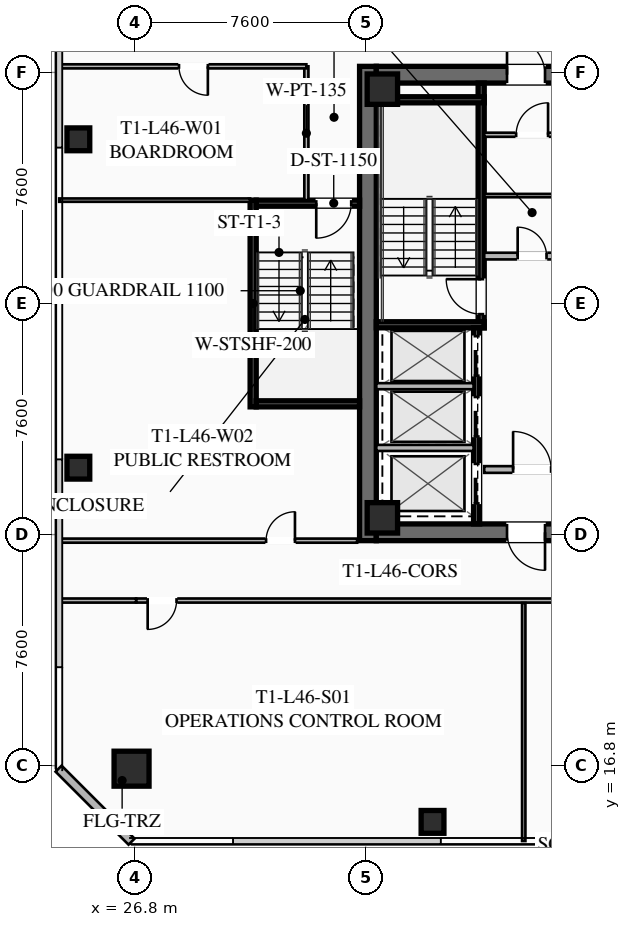
"""IFC4 building model, lengths in metres.
Left out: names, types, materials, properties, quantities, classifications, styles, units other than length and angle.
Written with IfcOpenShell. Run it as: python <this file> out.ifc"""

import sys

from ifc_helpers import new_model, si_unit, direction, frame, frame_2d, origin, origin_2d, place, context, subcontext, project, spatial, rectangle, hollow_rectangle, extrude, element, fill, save


model = new_model("IFC4")
c1 = context("Model", 3, precision=1e-05, world=origin(), true_north=direction((0.0, 1.0)))
c2 = subcontext(c1, "Body", "Model", "MODEL_VIEW")
j1 = project(units=[si_unit("LENGTHUNIT", "METRE"), si_unit("PLANEANGLEUNIT", "RADIAN")], contexts=[c1])
p1 = place(None, origin())
s1 = spatial("IfcSite", under=j1, at=p1, CompositionType="ELEMENT")
p2 = place(p1, origin())
s2 = spatial("IfcBuilding", under=s1, at=p2, CompositionType="ELEMENT")
p3 = place(p2, frame((0.0, 0.0, 171.2)))
s3 = spatial("IfcBuildingStorey", under=s2, at=p3, CompositionType="ELEMENT", Elevation=171.2)
p4 = place(p3, frame((34.475, 24.2, 0.0), z_axis=(0.0, 0.0, 1.0), x_axis=(0.0, 1.0, 0.0)))
e1 = element("IfcWall", 1, at=p4, inside=s3, PredefinedType="SHEAR", context=c2, shape_type="SweptSolid", body=[
    extrude(rectangle(XDim=15.6, YDim=0.55, at=frame_2d((7.8, 0.0))), origin(), (0.0, 0.0, 1.0), 3.55),
])
p5 = place(p3, frame((49.25, 24.475, 0.0), z_axis=(0.0, 0.0, 1.0), x_axis=(-1.0, 0.0, 0.0)))
e2 = element("IfcWall", 2, at=p5, inside=s3, PredefinedType="SHEAR", context=c2, shape_type="SweptSolid", body=[
    extrude(rectangle(XDim=14.5, YDim=0.55, at=frame_2d((7.25, 0.0))), origin(), (0.0, 0.0, 1.0), 3.55),
])
p6 = place(p5, frame((8.95, 0.0, 0.0)))
e3 = element("IfcOpeningElement", 3, at=p6, cuts=e2, PredefinedType="OPENING", context=c2, shape_type="SweptSolid", body=[
    extrude(rectangle(XDim=1.25, YDim=2.25, at=frame_2d((0.625, 1.125))), frame((0.0, 0.285, 0.0), z_axis=(0.0, -1.0, 0.0), x_axis=(1.0, 0.0, 0.0)), (0.0, 0.0, 1.0), 0.57),
])
p7 = place(p5, frame((3.9, 0.0, 0.0)))
e4 = element("IfcOpeningElement", 4, at=p7, cuts=e2, PredefinedType="OPENING", context=c2, shape_type="SweptSolid", body=[
    extrude(rectangle(XDim=1.25, YDim=2.25, at=frame_2d((0.625, 1.125))), frame((0.0, 0.285, 0.0), z_axis=(0.0, -1.0, 0.0), x_axis=(1.0, 0.0, 0.0)), (0.0, 0.0, 1.0), 0.57),
])
p8 = place(p3, frame((34.75, 39.525, 0.0), z_axis=(0.0, 0.0, 1.0), x_axis=(1.0, 0.0, 0.0)))
e5 = element("IfcWall", 5, at=p8, inside=s3, PredefinedType="SHEAR", context=c2, shape_type="SweptSolid", body=[
    extrude(rectangle(XDim=14.5, YDim=0.55, at=frame_2d((7.25, 0.0))), origin(), (0.0, 0.0, 1.0), 3.55),
])
p9 = place(p8, frame((4.3, 0.0, 0.0)))
e6 = element("IfcOpeningElement", 6, at=p9, cuts=e5, PredefinedType="OPENING", context=c2, shape_type="SweptSolid", body=[
    extrude(rectangle(XDim=1.25, YDim=2.25, at=frame_2d((0.625, 1.125))), frame((0.0, 0.285, 0.0), z_axis=(0.0, -1.0, 0.0), x_axis=(1.0, 0.0, 0.0)), (0.0, 0.0, 1.0), 0.57),
])
p10 = place(p8, frame((9.35, 0.0, 0.0)))
e7 = element("IfcOpeningElement", 7, at=p10, cuts=e5, PredefinedType="OPENING", context=c2, shape_type="SweptSolid", body=[
    extrude(rectangle(XDim=1.25, YDim=2.25, at=frame_2d((0.625, 1.125))), frame((0.0, 0.285, 0.0), z_axis=(0.0, -1.0, 0.0), x_axis=(1.0, 0.0, 0.0)), (0.0, 0.0, 1.0), 0.57),
])
for number, where, z_axis, x_axis in (
    (8, (34.95, 24.95, 0.0), (0.0, 0.0, 1.0), (1.0, 0.0, 0.0)),
    (9, (34.95, 39.05, 0.0), (0.0, 0.0, 1.0), (1.0, 0.0, 0.0)),
):
    element("IfcColumn", number, at=place(p3, frame(where, z_axis=z_axis, x_axis=x_axis)), inside=s3, PredefinedType="COLUMN", context=c2, shape_type="SweptSolid", body=[
        extrude(hollow_rectangle(XDim=1.0, YDim=1.0, WallThickness=0.04, at=origin_2d()), origin(), (0.0, 0.0, 1.0), 3.37),
    ])
p11 = place(p3, frame((26.7, 16.7, 0.0), z_axis=(0.0, 0.0, 1.0), x_axis=(1.0, 0.0, 0.0)))
e10 = element("IfcColumn", 10, at=p11, inside=s3, PredefinedType="COLUMN", context=c2, shape_type="SweptSolid", body=[
    extrude(hollow_rectangle(XDim=1.15, YDim=1.15, WallThickness=0.045, at=origin_2d()), origin(), (0.0, 0.0, 1.0), 3.37),
])
for number, where, z_axis, x_axis in (
    (11, (36.6, 14.95, 0.0), (0.0, 0.0, 1.0), (1.0, 0.0, 0.0)),
    (12, (24.95, 37.4, 0.0), (0.0, 0.0, 1.0), (1.0, 0.0, 0.0)),
    (13, (24.95, 26.6, 0.0), (0.0, 0.0, 1.0), (1.0, 0.0, 0.0)),
):
    element("IfcColumn", number, at=place(p3, frame(where, z_axis=z_axis, x_axis=x_axis)), inside=s3, PredefinedType="COLUMN", context=c2, shape_type="SweptSolid", body=[
        extrude(hollow_rectangle(XDim=0.75, YDim=0.75, WallThickness=0.032, at=origin_2d()), origin(), (0.0, 0.0, 1.0), 3.37),
    ])
p12 = place(p3, frame((26.7, 14.3, 0.0), z_axis=(0.0, 0.0, 1.0), x_axis=(-0.707106781187, 0.707106781187, 0.0)))
e14 = element("IfcWall", 14, at=p12, inside=s3, PredefinedType="SOLIDWALL", context=c2, shape_type="SweptSolid", body=[
    extrude(rectangle(XDim=3.394, YDim=0.28, at=frame_2d((1.697, 0.0))), origin(), (0.0, 0.0, 1.0), 3.37),
])
p13 = place(p3, frame((38.2, 31.2, 0.0), z_axis=(0.0, 0.0, 1.0), x_axis=(0.0, 1.0, 0.0)))
e15 = element("IfcWall", 15, at=p13, inside=s3, PredefinedType="SHEAR", context=c2, shape_type="SweptSolid", body=[
    extrude(rectangle(XDim=8.05, YDim=0.2, at=frame_2d((4.025, 0.0))), origin(), (0.0, 0.0, 1.0), 3.37),
])
p14 = place(p13, frame((0.45, 0.0, 0.0)))
e16 = element("IfcOpeningElement", 16, at=p14, cuts=e15, PredefinedType="OPENING", context=c2, shape_type="SweptSolid", body=[
    extrude(rectangle(XDim=1.15, YDim=2.2, at=frame_2d((0.575, 1.1))), frame((0.0, 0.11, 0.0), z_axis=(0.0, -1.0, 0.0), x_axis=(1.0, 0.0, 0.0)), (0.0, 0.0, 1.0), 0.22),
])
for number, where, z_axis, x_axis in (
    (17, (34.75, 31.3, 0.0), (0.0, 0.0, 1.0), (1.0, 0.0, 0.0)),
    (18, (34.75, 38.7, 0.0), (0.0, 0.0, 1.0), (1.0, 0.0, 0.0)),
):
    element("IfcWall", number, at=place(p3, frame(where, z_axis=z_axis, x_axis=x_axis)), inside=s3, PredefinedType="SHEAR", context=c2, shape_type="SweptSolid", body=[
        extrude(rectangle(XDim=3.55, YDim=0.2, at=frame_2d((1.775, 0.0))), origin(), (0.0, 0.0, 1.0), 3.37),
    ])
p15 = place(p3, frame((38.3, 33.56, 0.0), z_axis=(0.0, 0.0, 1.0), x_axis=(1.0, 0.0, 0.0)))
e19 = element("IfcWall", 19, at=p15, inside=s3, PredefinedType="SOLIDWALL", context=c2, shape_type="SweptSolid", body=[
    extrude(rectangle(XDim=3.15, YDim=0.22, at=frame_2d((1.575, 0.0))), origin(), (0.0, 0.0, 1.0), 2.723),
])
p16 = place(p15, frame((1.1, 0.0, 0.0)))
e20 = element("IfcOpeningElement", 20, at=p16, cuts=e19, PredefinedType="OPENING", context=c2, shape_type="SweptSolid", body=[
    extrude(rectangle(XDim=0.95, YDim=2.05, at=frame_2d((0.475, 1.025))), frame((0.0, 0.12, 0.0), z_axis=(0.0, -1.0, 0.0), x_axis=(1.0, 0.0, 0.0)), (0.0, 0.0, 1.0), 0.24),
])
p17 = place(p3, frame((38.3, 26.54, 0.0), z_axis=(0.0, 0.0, 1.0), x_axis=(1.0, 0.0, 0.0)))
e21 = element("IfcWall", 21, at=p17, inside=s3, PredefinedType="SOLIDWALL", context=c2, shape_type="SweptSolid", body=[
    extrude(rectangle(XDim=3.15, YDim=0.22, at=frame_2d((1.575, 0.0))), origin(), (0.0, 0.0, 1.0), 2.723),
])
p18 = place(p17, frame((0.95, 0.0, 0.0)))
e22 = element("IfcOpeningElement", 22, at=p18, cuts=e21, PredefinedType="OPENING", context=c2, shape_type="SweptSolid", body=[
    extrude(rectangle(XDim=1.25, YDim=2.25, at=frame_2d((0.625, 1.125))), frame((0.0, 0.12, 0.0), z_axis=(0.0, -1.0, 0.0), x_axis=(1.0, 0.0, 0.0)), (0.0, 0.0, 1.0), 0.24),
])
p19 = place(p3, frame((38.05, 24.75, 0.0), z_axis=(0.0, 0.0, 1.0), x_axis=(0.0, 1.0, 0.0)))
e23 = element("IfcWall", 23, at=p19, inside=s3, PredefinedType="SHEAR", context=c2, shape_type="SweptSolid", body=[
    extrude(rectangle(XDim=6.45, YDim=0.2, at=frame_2d((3.225, 0.0))), origin(), (0.0, 0.0, 1.0), 3.37),
])
p20 = place(p19, frame((4.875, 0.0, 0.0)))
e24 = element("IfcOpeningElement", 24, at=p20, cuts=e23, PredefinedType="OPENING", context=c2, shape_type="SweptSolid", body=[
    extrude(rectangle(XDim=1.3, YDim=2.25, at=frame_2d((0.65, 1.125))), frame((0.0, 0.11, 0.0), z_axis=(0.0, -1.0, 0.0), x_axis=(1.0, 0.0, 0.0)), (0.0, 0.0, 1.0), 0.22),
])
p21 = place(p19, frame((2.875, 0.0, 0.0)))
e25 = element("IfcOpeningElement", 25, at=p21, cuts=e23, PredefinedType="OPENING", context=c2, shape_type="SweptSolid", body=[
    extrude(rectangle(XDim=1.3, YDim=2.25, at=frame_2d((0.65, 1.125))), frame((0.0, 0.11, 0.0), z_axis=(0.0, -1.0, 0.0), x_axis=(1.0, 0.0, 0.0)), (0.0, 0.0, 1.0), 0.22),
])
p22 = place(p19, frame((0.675, 0.0, 0.0)))
e26 = element("IfcOpeningElement", 26, at=p22, cuts=e23, PredefinedType="OPENING", context=c2, shape_type="SweptSolid", body=[
    extrude(rectangle(XDim=1.3, YDim=2.25, at=frame_2d((0.65, 1.125))), frame((0.0, 0.11, 0.0), z_axis=(0.0, -1.0, 0.0), x_axis=(1.0, 0.0, 0.0)), (0.0, 0.0, 1.0), 0.22),
])
for number, where, z_axis, x_axis in (
    (27, (34.75, 27.25, 0.0), (0.0, 0.0, 1.0), (1.0, 0.0, 0.0)),
    (28, (34.75, 29.28, 0.0), (0.0, 0.0, 1.0), (1.0, 0.0, 0.0)),
):
    element("IfcWall", number, at=place(p3, frame(where, z_axis=z_axis, x_axis=x_axis)), inside=s3, PredefinedType="SOLIDWALL", context=c2, shape_type="SweptSolid", body=[
        extrude(rectangle(XDim=3.2, YDim=0.2, at=frame_2d((1.6, 0.0))), origin(), (0.0, 0.0, 1.0), 3.37),
    ])
p23 = place(p3, frame((38.3, 37.55, 0.0), z_axis=(0.0, 0.0, 1.0), x_axis=(1.0, 0.0, 0.0)))
e29 = element("IfcWall", 29, at=p23, inside=s3, PredefinedType="PARTITIONING", context=c2, shape_type="SweptSolid", body=[
    extrude(rectangle(XDim=3.15, YDim=0.135, at=frame_2d((1.575, 0.0))), origin(), (0.0, 0.0, 1.0), 2.723),
])
p24 = place(p23, frame((1.05, 0.0, 0.0)))
e30 = element("IfcOpeningElement", 30, at=p24, cuts=e29, PredefinedType="OPENING", context=c2, shape_type="SweptSolid", body=[
    extrude(rectangle(XDim=1.05, YDim=2.2, at=frame_2d((0.525, 1.1))), frame((0.0, 0.077, 0.0), z_axis=(0.0, -1.0, 0.0), x_axis=(1.0, 0.0, 0.0)), (0.0, 0.0, 1.0), 0.155),
])
p25 = place(p3, frame((38.3, 35.55, 0.0), z_axis=(0.0, 0.0, 1.0), x_axis=(1.0, 0.0, 0.0)))
e31 = element("IfcWall", 31, at=p25, inside=s3, PredefinedType="PARTITIONING", context=c2, shape_type="SweptSolid", body=[
    extrude(rectangle(XDim=3.15, YDim=0.11, at=frame_2d((1.575, 0.0))), origin(), (0.0, 0.0, 1.0), 2.723),
])
p26 = place(p3, frame((30.7, 28.6, 0.0), z_axis=(0.0, 0.0, 1.0), x_axis=(0.0, 1.0, 0.0)))
e32 = element("IfcWall", 32, at=p26, inside=s3, PredefinedType="SHEAR", context=c2, shape_type="SweptSolid", body=[
    extrude(rectangle(XDim=6.8, YDim=0.2, at=frame_2d((3.4, 0.0))), origin(), (0.0, 0.0, 1.0), 3.37),
])
p27 = place(p3, frame((34.2, 35.3, 0.0), z_axis=(0.0, 0.0, 1.0), x_axis=(-1.0, 0.0, 0.0)))
e33 = element("IfcWall", 33, at=p27, inside=s3, PredefinedType="SHEAR", context=c2, shape_type="SweptSolid", body=[
    extrude(rectangle(XDim=3.4, YDim=0.2, at=frame_2d((1.7, 0.0))), origin(), (0.0, 0.0, 1.0), 3.37),
])
p28 = place(p27, frame((0.275, 0.0, 0.0)))
e34 = element("IfcOpeningElement", 34, at=p28, cuts=e33, PredefinedType="OPENING", context=c2, shape_type="SweptSolid", body=[
    extrude(rectangle(XDim=1.15, YDim=2.2, at=frame_2d((0.575, 1.1))), frame((0.0, 0.11, 0.0), z_axis=(0.0, -1.0, 0.0), x_axis=(1.0, 0.0, 0.0)), (0.0, 0.0, 1.0), 0.22),
])
p29 = place(p3, frame((30.8, 28.7, 0.0), z_axis=(0.0, 0.0, 1.0), x_axis=(1.0, 0.0, 0.0)))
e35 = element("IfcWall", 35, at=p29, inside=s3, PredefinedType="SHEAR", context=c2, shape_type="SweptSolid", body=[
    extrude(rectangle(XDim=3.4, YDim=0.2, at=frame_2d((1.7, 0.0))), origin(), (0.0, 0.0, 1.0), 3.37),
])
p30 = place(p3, frame((32.45, 35.4, 0.0), z_axis=(0.0, 0.0, 1.0), x_axis=(0.0, 1.0, 0.0)))
e36 = element("IfcWall", 36, at=p30, inside=s3, PredefinedType="PARTITIONING", context=c2, shape_type="SweptSolid", body=[
    extrude(rectangle(XDim=4.4, YDim=0.135, at=frame_2d((2.2, 0.0))), origin(), (0.0, 0.0, 1.0), 2.723),
])
p31 = place(p3, frame((57.15, 22.23, 0.0), z_axis=(0.0, 0.0, 1.0), x_axis=(-1.0, 0.0, 0.0)))
e37 = element("IfcWall", 37, at=p31, inside=s3, PredefinedType="PARTITIONING", context=c2, shape_type="SweptSolid", body=[
    extrude(rectangle(XDim=30.3, YDim=0.135, at=frame_2d((15.15, 0.0))), origin(), (0.0, 0.0, 1.0), 2.723),
])
p32 = place(p31, frame((28.97, 0.0, 0.0)))
e38 = element("IfcOpeningElement", 38, at=p32, cuts=e37, PredefinedType="OPENING", context=c2, shape_type="SweptSolid", body=[
    extrude(rectangle(XDim=0.95, YDim=2.05, at=frame_2d((0.475, 1.025))), frame((0.0, 0.077, 0.0), z_axis=(0.0, -1.0, 0.0), x_axis=(1.0, 0.0, 0.0)), (0.0, 0.0, 1.0), 0.155),
])
p33 = place(p31, frame((14.438, 0.0, 0.0)))
e39 = element("IfcOpeningElement", 39, at=p33, cuts=e37, PredefinedType="OPENING", context=c2, shape_type="SweptSolid", body=[
    extrude(rectangle(XDim=0.95, YDim=2.05, at=frame_2d((0.475, 1.025))), frame((0.0, 0.077, 0.0), z_axis=(0.0, -1.0, 0.0), x_axis=(1.0, 0.0, 0.0)), (0.0, 0.0, 1.0), 0.155),
])
p34 = place(p31, frame((0.38, 0.0, 0.0)))
e40 = element("IfcOpeningElement", 40, at=p34, cuts=e37, PredefinedType="OPENING", context=c2, shape_type="SweptSolid", body=[
    extrude(rectangle(XDim=0.95, YDim=2.05, at=frame_2d((0.475, 1.025))), frame((0.0, 0.077, 0.0), z_axis=(0.0, -1.0, 0.0), x_axis=(1.0, 0.0, 0.0)), (0.0, 0.0, 1.0), 0.155),
])
p35 = place(p3, frame((24.32, 22.23, 0.0), z_axis=(0.0, 0.0, 1.0), x_axis=(1.0, 0.0, 0.0)))
e41 = element("IfcWall", 41, at=p35, inside=s3, PredefinedType="PARTITIONING", context=c2, shape_type="SweptSolid", body=[
    extrude(rectangle(XDim=2.53, YDim=0.135, at=frame_2d((1.265, 0.0))), origin(), (0.0, 0.0, 1.0), 2.723),
])
p36 = place(p3, frame((39.6, 14.32, 0.0), z_axis=(0.0, 0.0, 1.0), x_axis=(0.0, 1.0, 0.0)))
e42 = element("IfcWall", 42, at=p36, inside=s3, PredefinedType="PARTITIONING", context=c2, shape_type="SweptSolid", body=[
    extrude(rectangle(XDim=7.83, YDim=0.11, at=frame_2d((3.915, 0.0))), origin(), (0.0, 0.0, 1.0), 2.723),
])
p37 = place(p3, frame((32.45, 39.8, 0.0), z_axis=(0.0, 0.0, 1.0), x_axis=(-1.0, 0.0, 0.0)))
e43 = element("IfcWall", 43, at=p37, inside=s3, PredefinedType="PARTITIONING", context=c2, shape_type="SweptSolid", body=[
    extrude(rectangle(XDim=8.13, YDim=0.135, at=frame_2d((4.065, 0.0))), origin(), (0.0, 0.0, 1.0), 2.723),
])
p38 = place(p37, frame((3.24, 0.0, 0.0)))
e44 = element("IfcOpeningElement", 44, at=p38, cuts=e43, PredefinedType="OPENING", context=c2, shape_type="SweptSolid", body=[
    extrude(rectangle(XDim=0.95, YDim=2.05, at=frame_2d((0.475, 1.025))), frame((0.0, 0.077, 0.0), z_axis=(0.0, -1.0, 0.0), x_axis=(1.0, 0.0, 0.0)), (0.0, 0.0, 1.0), 0.155),
])
p39 = place(p3, frame((24.32, 24.2, 0.0), z_axis=(0.0, 0.0, 1.0), x_axis=(1.0, 0.0, 0.0)))
e45 = element("IfcWall", 45, at=p39, inside=s3, PredefinedType="PARTITIONING", context=c2, shape_type="SweptSolid", body=[
    extrude(rectangle(XDim=9.8, YDim=0.135, at=frame_2d((4.9, 0.0))), origin(), (0.0, 0.0, 1.0), 2.723),
])
p40 = place(p39, frame((6.805, 0.0, 0.0)))
e46 = element("IfcOpeningElement", 46, at=p40, cuts=e45, PredefinedType="OPENING", context=c2, shape_type="SweptSolid", body=[
    extrude(rectangle(XDim=0.95, YDim=2.05, at=frame_2d((0.475, 1.025))), frame((0.0, 0.077, 0.0), z_axis=(0.0, -1.0, 0.0), x_axis=(1.0, 0.0, 0.0)), (0.0, 0.0, 1.0), 0.155),
])
p41 = place(p3, frame((30.6, 35.4, 0.0), z_axis=(0.0, 0.0, 1.0), x_axis=(-1.0, 0.0, 0.0)))
e47 = element("IfcWall", 47, at=p41, inside=s3, PredefinedType="PARTITIONING", context=c2, shape_type="SweptSolid", body=[
    extrude(rectangle(XDim=6.28, YDim=0.11, at=frame_2d((3.14, 0.0))), origin(), (0.0, 0.0, 1.0), 2.723),
])
p42 = place(p9, origin())
e48 = element("IfcDoor", 48, at=p42, inside=s3, OperationType="SINGLE_SWING_LEFT", PredefinedType="DOOR", context=c2, shape_type="SweptSolid", body=[
    extrude(rectangle(XDim=1.25, YDim=2.25, at=frame_2d((0.625, 1.125))), frame((0.0, 0.025, 0.0), z_axis=(0.0, -1.0, 0.0), x_axis=(1.0, 0.0, 0.0)), (0.0, 0.0, 1.0), 0.05),
])
fill(e6, e48)
p43 = place(p6, origin())
e49 = element("IfcDoor", 49, at=p43, inside=s3, OperationType="SINGLE_SWING_LEFT", PredefinedType="DOOR", context=c2, shape_type="SweptSolid", body=[
    extrude(rectangle(XDim=1.25, YDim=2.25, at=frame_2d((0.625, 1.125))), frame((0.0, 0.025, 0.0), z_axis=(0.0, -1.0, 0.0), x_axis=(1.0, 0.0, 0.0)), (0.0, 0.0, 1.0), 0.05),
])
fill(e3, e49)
p44 = place(p14, origin())
e50 = element("IfcDoor", 50, at=p44, inside=s3, OperationType="SINGLE_SWING_RIGHT", PredefinedType="DOOR", context=c2, shape_type="SweptSolid", body=[
    extrude(rectangle(XDim=1.15, YDim=2.2, at=frame_2d((0.575, 1.1))), frame((0.0, 0.025, 0.0), z_axis=(0.0, -1.0, 0.0), x_axis=(1.0, 0.0, 0.0)), (0.0, 0.0, 1.0), 0.05),
])
fill(e16, e50)
p45 = place(p18, origin())
e51 = element("IfcDoor", 51, at=p45, inside=s3, OperationType="SINGLE_SWING_LEFT", PredefinedType="DOOR", context=c2, shape_type="SweptSolid", body=[
    extrude(rectangle(XDim=1.25, YDim=2.25, at=frame_2d((0.625, 1.125))), frame((0.0, 0.025, 0.0), z_axis=(0.0, -1.0, 0.0), x_axis=(1.0, 0.0, 0.0)), (0.0, 0.0, 1.0), 0.05),
])
fill(e22, e51)
p46 = place(p24, origin())
e52 = element("IfcDoor", 52, at=p46, inside=s3, OperationType="SINGLE_SWING_RIGHT", PredefinedType="DOOR", context=c2, shape_type="SweptSolid", body=[
    extrude(rectangle(XDim=1.05, YDim=2.2, at=frame_2d((0.525, 1.1))), frame((0.0, 0.025, 0.0), z_axis=(0.0, -1.0, 0.0), x_axis=(1.0, 0.0, 0.0)), (0.0, 0.0, 1.0), 0.05),
])
fill(e30, e52)
p47 = place(p16, origin())
e53 = element("IfcDoor", 53, at=p47, inside=s3, OperationType="SINGLE_SWING_LEFT", PredefinedType="DOOR", context=c2, shape_type="SweptSolid", body=[
    extrude(rectangle(XDim=0.95, YDim=2.05, at=frame_2d((0.475, 1.025))), frame((0.0, 0.025, 0.0), z_axis=(0.0, -1.0, 0.0), x_axis=(1.0, 0.0, 0.0)), (0.0, 0.0, 1.0), 0.05),
])
fill(e20, e53)
p48 = place(p28, origin())
e54 = element("IfcDoor", 54, at=p48, inside=s3, OperationType="SINGLE_SWING_RIGHT", PredefinedType="DOOR", context=c2, shape_type="SweptSolid", body=[
    extrude(rectangle(XDim=1.15, YDim=2.2, at=frame_2d((0.575, 1.1))), frame((0.0, 0.025, 0.0), z_axis=(0.0, -1.0, 0.0), x_axis=(1.0, 0.0, 0.0)), (0.0, 0.0, 1.0), 0.05),
])
fill(e34, e54)
p49 = place(p32, origin())
e55 = element("IfcDoor", 55, at=p49, inside=s3, OperationType="SINGLE_SWING_RIGHT", PredefinedType="DOOR", context=c2, shape_type="SweptSolid", body=[
    extrude(rectangle(XDim=0.95, YDim=2.05, at=frame_2d((0.475, 1.025))), frame((0.0, 0.025, 0.0), z_axis=(0.0, -1.0, 0.0), x_axis=(1.0, 0.0, 0.0)), (0.0, 0.0, 1.0), 0.05),
])
fill(e38, e55)
p50 = place(p38, origin())
e56 = element("IfcDoor", 56, at=p50, inside=s3, OperationType="SINGLE_SWING_LEFT", PredefinedType="DOOR", context=c2, shape_type="SweptSolid", body=[
    extrude(rectangle(XDim=0.95, YDim=2.05, at=frame_2d((0.475, 1.025))), frame((0.0, 0.025, 0.0), z_axis=(0.0, -1.0, 0.0), x_axis=(1.0, 0.0, 0.0)), (0.0, 0.0, 1.0), 0.05),
])
fill(e44, e56)
p51 = place(p40, origin())
e57 = element("IfcDoor", 57, at=p51, inside=s3, OperationType="SINGLE_SWING_RIGHT", PredefinedType="DOOR", context=c2, shape_type="SweptSolid", body=[
    extrude(rectangle(XDim=0.95, YDim=2.05, at=frame_2d((0.475, 1.025))), frame((0.0, 0.025, 0.0), z_axis=(0.0, -1.0, 0.0), x_axis=(1.0, 0.0, 0.0)), (0.0, 0.0, 1.0), 0.05),
])
fill(e46, e57)
p52 = place(p20, origin())
e58 = element("IfcDoor", 58, at=p52, inside=s3, OperationType="SLIDING_TO_LEFT", PredefinedType="DOOR", context=c2, shape_type="SweptSolid", body=[
    extrude(rectangle(XDim=1.3, YDim=2.25, at=frame_2d((0.65, 1.125))), frame((0.0, 0.025, 0.0), z_axis=(0.0, -1.0, 0.0), x_axis=(1.0, 0.0, 0.0)), (0.0, 0.0, 1.0), 0.05),
])
fill(e24, e58)
p53 = place(p21, origin())
e59 = element("IfcDoor", 59, at=p53, inside=s3, OperationType="SLIDING_TO_LEFT", PredefinedType="DOOR", context=c2, shape_type="SweptSolid", body=[
    extrude(rectangle(XDim=1.3, YDim=2.25, at=frame_2d((0.65, 1.125))), frame((0.0, 0.025, 0.0), z_axis=(0.0, -1.0, 0.0), x_axis=(1.0, 0.0, 0.0)), (0.0, 0.0, 1.0), 0.05),
])
fill(e25, e59)
p54 = place(p22, origin())
e60 = element("IfcDoor", 60, at=p54, inside=s3, OperationType="SLIDING_TO_LEFT", PredefinedType="DOOR", context=c2, shape_type="SweptSolid", body=[
    extrude(rectangle(XDim=1.3, YDim=2.25, at=frame_2d((0.65, 1.125))), frame((0.0, 0.025, 0.0), z_axis=(0.0, -1.0, 0.0), x_axis=(1.0, 0.0, 0.0)), (0.0, 0.0, 1.0), 0.05),
])
fill(e26, e60)
save(model, sys.argv[1])
